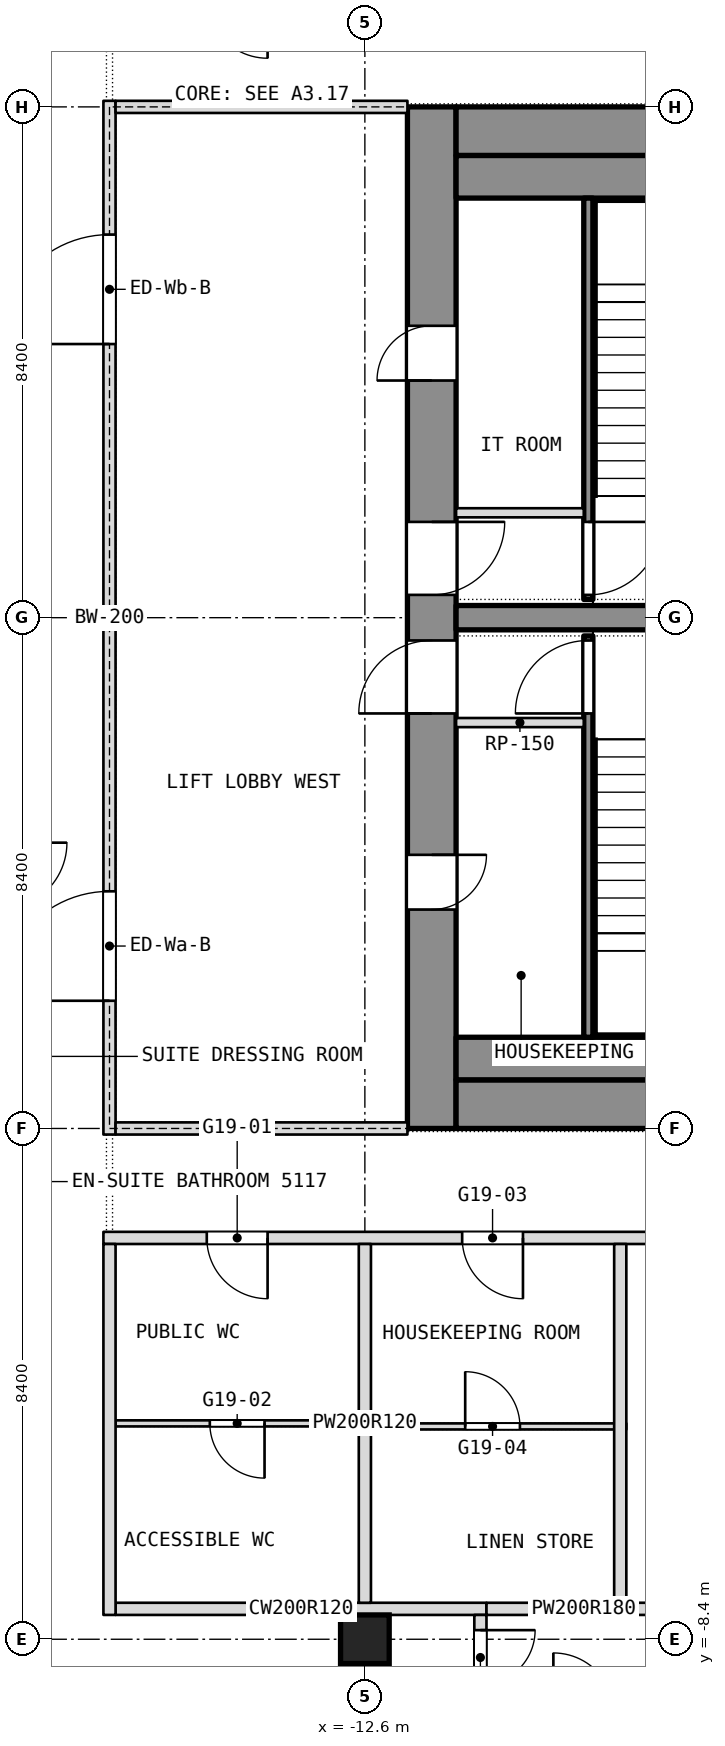
"""IFC4 building model, lengths in metres.
Left out: names, types, materials, properties, quantities, classifications, styles, units other than length and angle.
Written with IfcOpenShell. Run it as: python <this file> out.ifc"""

import sys

from ifc_helpers import new_model, si_unit, direction, frame, frame_2d, origin, origin_2d, place, context, subcontext, project, spatial, rectangle, extrude, element, fill, save


model = new_model("IFC4")
c1 = context("Model", 3, precision=1e-05, world=origin(), true_north=direction((0.0, 1.0)))
c2 = subcontext(c1, "Body", "Model", "MODEL_VIEW")
j1 = project(units=[si_unit("LENGTHUNIT", "METRE"), si_unit("PLANEANGLEUNIT", "RADIAN")], contexts=[c1])
p1 = place(None, origin())
s1 = spatial("IfcSite", under=j1, at=p1, CompositionType="ELEMENT")
p2 = place(p1, origin())
s2 = spatial("IfcBuilding", under=s1, at=p2, CompositionType="ELEMENT")
p3 = place(p2, frame((0.0, 0.0, 220.1)))
s3 = spatial("IfcBuildingStorey", under=s2, at=p3, CompositionType="ELEMENT", Elevation=220.1)
p4 = place(p3, frame((-11.5, 0.0, 0.0), z_axis=(0.0, 0.0, 1.0), x_axis=(0.0, 1.0, 0.0)))
e1 = element("IfcWall", 1, at=p4, inside=s3, PredefinedType="SHEAR", context=c2, shape_type="SweptSolid", body=[
    extrude(rectangle(XDim=16.8, YDim=0.8, at=frame_2d((8.4, 0.0))), origin(), (0.0, 0.0, 1.0), 3.6),
])
p5 = place(p4, frame((3.6, 0.0, 0.0)))
e2 = element("IfcOpeningElement", 2, at=p5, cuts=e1, PredefinedType="OPENING", context=c2, shape_type="SweptSolid", body=[
    extrude(rectangle(XDim=0.9, YDim=2.1, at=frame_2d((0.45, 1.05))), frame((0.0, 0.4, 0.0), z_axis=(0.0, -1.0, 0.0), x_axis=(1.0, 0.0, 0.0)), (0.0, 0.0, 1.0), 0.8),
])
p6 = place(p4, frame((6.825, 0.0, 0.0)))
e3 = element("IfcOpeningElement", 3, at=p6, cuts=e1, PredefinedType="OPENING", context=c2, shape_type="SweptSolid", body=[
    extrude(rectangle(XDim=1.2, YDim=2.1, at=frame_2d((0.6, 1.05))), frame((0.0, 0.4, 0.0), z_axis=(0.0, -1.0, 0.0), x_axis=(1.0, 0.0, 0.0)), (0.0, 0.0, 1.0), 0.8),
])
p7 = place(p4, frame((12.3, 0.0, 0.0)))
e4 = element("IfcOpeningElement", 4, at=p7, cuts=e1, PredefinedType="OPENING", context=c2, shape_type="SweptSolid", body=[
    extrude(rectangle(XDim=0.9, YDim=2.1, at=frame_2d((0.45, 1.05))), frame((0.0, 0.4, 0.0), z_axis=(0.0, -1.0, 0.0), x_axis=(1.0, 0.0, 0.0)), (0.0, 0.0, 1.0), 0.8),
])
p8 = place(p4, frame((8.775, 0.0, 0.0)))
e5 = element("IfcOpeningElement", 5, at=p8, cuts=e1, PredefinedType="OPENING", context=c2, shape_type="SweptSolid", body=[
    extrude(rectangle(XDim=1.2, YDim=2.1, at=frame_2d((0.6, 1.05))), frame((0.0, 0.4, 0.0), z_axis=(0.0, -1.0, 0.0), x_axis=(1.0, 0.0, 0.0)), (0.0, 0.0, 1.0), 0.8),
])
for number, where, z_axis, x_axis in (
    (6, (-11.1, 0.4, 0.0), (0.0, 0.0, 1.0), (1.0, 0.0, 0.0)),
    (7, (-11.1, 16.4, 0.0), (0.0, 0.0, 1.0), (1.0, 0.0, 0.0)),
):
    element("IfcWall", number, at=place(p3, frame(where, z_axis=z_axis, x_axis=x_axis)), inside=s3, PredefinedType="SHEAR", context=c2, shape_type="SweptSolid", body=[
        extrude(rectangle(XDim=22.2, YDim=0.8, at=frame_2d((11.1, 0.0))), origin(), (0.0, 0.0, 1.0), 3.6),
    ])
p9 = place(p3, frame((-11.1, 8.4, 0.0), z_axis=(0.0, 0.0, 1.0), x_axis=(1.0, 0.0, 0.0)))
e8 = element("IfcWall", 8, at=p9, inside=s3, PredefinedType="SHEAR", context=c2, shape_type="SweptSolid", body=[
    extrude(rectangle(XDim=6.7, YDim=0.4, at=frame_2d((3.35, 0.0))), origin(), (0.0, 0.0, 1.0), 3.6),
])
p10 = place(p3, frame((-12.6, -8.4, 0.0), z_axis=(0.0, 0.0, 1.0), x_axis=(1.0, 0.0, 0.0)))
e9 = element("IfcColumn", 9, at=p10, inside=s3, PredefinedType="COLUMN", context=c2, shape_type="SweptSolid", body=[
    extrude(rectangle(XDim=0.8, YDim=0.8, at=origin_2d()), origin(), (0.0, 0.0, 1.0), 3.6),
])
p11 = place(p3, frame((-16.7, -7.9, 0.0), z_axis=(0.0, 0.0, 1.0), x_axis=(1.0, 0.0, 0.0)))
e10 = element("IfcWall", 10, at=p11, inside=s3, PredefinedType="PARTITIONING", context=c2, shape_type="SweptSolid", body=[
    extrude(rectangle(XDim=6.1, YDim=0.2, at=frame_2d((3.05, 0.0))), origin(), (0.0, 0.0, 1.0), 3.34),
])
p12 = place(p3, frame((-10.6, -7.9, 0.0), z_axis=(0.0, 0.0, 1.0), x_axis=(1.0, 0.0, 0.0)))
e11 = element("IfcWall", 11, at=p12, inside=s3, PredefinedType="PARTITIONING", context=c2, shape_type="SweptSolid", body=[
    extrude(rectangle(XDim=3.2, YDim=0.2, at=frame_2d((1.6, 0.0))), origin(), (0.0, 0.0, 1.0), 3.34),
])
p13 = place(p3, frame((-12.5, -4.9, 0.0), z_axis=(0.0, 0.0, 1.0), x_axis=(1.0, 0.0, 0.0)))
e12 = element("IfcWall", 12, at=p13, inside=s3, PredefinedType="PARTITIONING", context=c2, shape_type="SweptSolid", body=[
    extrude(rectangle(XDim=4.2, YDim=0.1, at=frame_2d((2.1, 0.0))), origin(), (0.0, 0.0, 1.0), 3.34),
])
p14 = place(p13, frame((1.55, 0.0, 0.0)))
e13 = element("IfcOpeningElement", 13, at=p14, cuts=e12, PredefinedType="OPENING", context=c2, shape_type="SweptSolid", body=[
    extrude(rectangle(XDim=0.9, YDim=2.1, at=frame_2d((0.45, 1.05))), frame((0.0, 0.05, 0.0), z_axis=(0.0, -1.0, 0.0), x_axis=(1.0, 0.0, 0.0)), (0.0, 0.0, 1.0), 0.1),
])
p15 = place(p3, frame((-16.7, -4.85, 0.0), z_axis=(0.0, 0.0, 1.0), x_axis=(1.0, 0.0, 0.0)))
e14 = element("IfcWall", 14, at=p15, inside=s3, PredefinedType="PARTITIONING", context=c2, shape_type="SweptSolid", body=[
    extrude(rectangle(XDim=4.2, YDim=0.1, at=frame_2d((2.1, 0.0))), origin(), (0.0, 0.0, 1.0), 3.34),
])
p16 = place(p15, frame((1.55, 0.0, 0.0)))
e15 = element("IfcOpeningElement", 15, at=p16, cuts=e14, PredefinedType="OPENING", context=c2, shape_type="SweptSolid", body=[
    extrude(rectangle(XDim=0.9, YDim=2.1, at=frame_2d((0.45, 1.05))), frame((0.0, 0.05, 0.0), z_axis=(0.0, -1.0, 0.0), x_axis=(1.0, 0.0, 0.0)), (0.0, 0.0, 1.0), 0.1),
])
p17 = place(p3, frame((-16.9, -1.8, 0.0), z_axis=(0.0, 0.0, 1.0), x_axis=(1.0, 0.0, 0.0)))
e16 = element("IfcWall", 16, at=p17, inside=s3, PredefinedType="PARTITIONING", context=c2, shape_type="SweptSolid", body=[
    extrude(rectangle(XDim=33.8, YDim=0.2, at=frame_2d((16.9, 0.0))), origin(), (0.0, 0.0, 1.0), 3.34),
])
p18 = place(p17, frame((1.7, 0.0, 0.0)))
e17 = element("IfcOpeningElement", 17, at=p18, cuts=e16, PredefinedType="OPENING", context=c2, shape_type="SweptSolid", body=[
    extrude(rectangle(XDim=1.0, YDim=2.1, at=frame_2d((0.5, 1.05))), frame((0.0, 0.1, 0.0), z_axis=(0.0, -1.0, 0.0), x_axis=(1.0, 0.0, 0.0)), (0.0, 0.0, 1.0), 0.2),
])
p19 = place(p17, frame((5.9, 0.0, 0.0)))
e18 = element("IfcOpeningElement", 18, at=p19, cuts=e16, PredefinedType="OPENING", context=c2, shape_type="SweptSolid", body=[
    extrude(rectangle(XDim=1.0, YDim=2.1, at=frame_2d((0.5, 1.05))), frame((0.0, 0.1, 0.0), z_axis=(0.0, -1.0, 0.0), x_axis=(1.0, 0.0, 0.0)), (0.0, 0.0, 1.0), 0.2),
])
p20 = place(p17, frame((10.1, 0.0, 0.0)))
e19 = element("IfcOpeningElement", 19, at=p20, cuts=e16, PredefinedType="OPENING", context=c2, shape_type="SweptSolid", body=[
    extrude(rectangle(XDim=1.0, YDim=2.1, at=frame_2d((0.5, 1.05))), frame((0.0, 0.1, 0.0), z_axis=(0.0, -1.0, 0.0), x_axis=(1.0, 0.0, 0.0)), (0.0, 0.0, 1.0), 0.2),
])
p21 = place(p17, frame((22.7, 0.0, 0.0)))
e20 = element("IfcOpeningElement", 20, at=p21, cuts=e16, PredefinedType="OPENING", context=c2, shape_type="SweptSolid", body=[
    extrude(rectangle(XDim=1.0, YDim=2.1, at=frame_2d((0.5, 1.05))), frame((0.0, 0.1, 0.0), z_axis=(0.0, -1.0, 0.0), x_axis=(1.0, 0.0, 0.0)), (0.0, 0.0, 1.0), 0.2),
])
p22 = place(p17, frame((26.9, 0.0, 0.0)))
e21 = element("IfcOpeningElement", 21, at=p22, cuts=e16, PredefinedType="OPENING", context=c2, shape_type="SweptSolid", body=[
    extrude(rectangle(XDim=1.0, YDim=2.1, at=frame_2d((0.5, 1.05))), frame((0.0, 0.1, 0.0), z_axis=(0.0, -1.0, 0.0), x_axis=(1.0, 0.0, 0.0)), (0.0, 0.0, 1.0), 0.2),
])
p23 = place(p17, frame((31.1, 0.0, 0.0)))
e22 = element("IfcOpeningElement", 22, at=p23, cuts=e16, PredefinedType="OPENING", context=c2, shape_type="SweptSolid", body=[
    extrude(rectangle(XDim=1.0, YDim=2.1, at=frame_2d((0.5, 1.05))), frame((0.0, 0.1, 0.0), z_axis=(0.0, -1.0, 0.0), x_axis=(1.0, 0.0, 0.0)), (0.0, 0.0, 1.0), 0.2),
])
p24 = place(p17, frame((16.4, 0.0, 0.0)))
e23 = element("IfcOpeningElement", 23, at=p24, cuts=e16, PredefinedType="OPENING", context=c2, shape_type="SweptSolid", body=[
    extrude(rectangle(XDim=1.0, YDim=2.1, at=frame_2d((0.5, 1.05))), frame((0.0, 0.1, 0.0), z_axis=(0.0, -1.0, 0.0), x_axis=(1.0, 0.0, 0.0)), (0.0, 0.0, 1.0), 0.2),
])
p25 = place(p3, frame((-8.4, -8.0, 0.0), z_axis=(0.0, 0.0, 1.0), x_axis=(0.0, 1.0, 0.0)))
e24 = element("IfcWall", 24, at=p25, inside=s3, PredefinedType="PARTITIONING", context=c2, shape_type="SweptSolid", body=[
    extrude(rectangle(XDim=6.1, YDim=0.2, at=frame_2d((3.05, 0.0))), origin(), (0.0, 0.0, 1.0), 3.34),
])
p26 = place(p3, frame((-10.7, -9.5, 0.0), z_axis=(0.0, 0.0, 1.0), x_axis=(0.0, 1.0, 0.0)))
e25 = element("IfcWall", 25, at=p26, inside=s3, PredefinedType="PARTITIONING", context=c2, shape_type="SweptSolid", body=[
    extrude(rectangle(XDim=1.5, YDim=0.2, at=frame_2d((0.75, 0.0))), origin(), (0.0, 0.0, 1.0), 3.34),
])
p27 = place(p26, frame((0.35, 0.0, 0.0)))
e26 = element("IfcOpeningElement", 26, at=p27, cuts=e25, PredefinedType="OPENING", context=c2, shape_type="SweptSolid", body=[
    extrude(rectangle(XDim=0.9, YDim=2.1, at=frame_2d((0.45, 1.05))), frame((0.0, 0.1, 0.0), z_axis=(0.0, -1.0, 0.0), x_axis=(1.0, 0.0, 0.0)), (0.0, 0.0, 1.0), 0.2),
])
p28 = place(p3, frame((-12.6, -7.8, 0.0), z_axis=(0.0, 0.0, 1.0), x_axis=(0.0, 1.0, 0.0)))
e27 = element("IfcWall", 27, at=p28, inside=s3, PredefinedType="PARTITIONING", context=c2, shape_type="SweptSolid", body=[
    extrude(rectangle(XDim=5.9, YDim=0.2, at=frame_2d((2.95, 0.0))), origin(), (0.0, 0.0, 1.0), 3.34),
])
p29 = place(p3, frame((-16.8, -8.0, 0.0), z_axis=(0.0, 0.0, 1.0), x_axis=(0.0, 1.0, 0.0)))
e28 = element("IfcWall", 28, at=p29, inside=s3, PredefinedType="PARTITIONING", context=c2, shape_type="SweptSolid", body=[
    extrude(rectangle(XDim=6.1, YDim=0.2, at=frame_2d((3.05, 0.0))), origin(), (0.0, 0.0, 1.0), 3.34),
])
for number, where, z_axis, x_axis in (
    (29, (-11.1, 1.15, 0.0), (0.0, 0.0, 1.0), (1.0, 0.0, 0.0)),
    (30, (-11.1, 15.65, 0.0), (0.0, 0.0, 1.0), (1.0, 0.0, 0.0)),
):
    element("IfcWall", number, at=place(p3, frame(where, z_axis=z_axis, x_axis=x_axis)), inside=s3, PredefinedType="PARTITIONING", context=c2, shape_type="SweptSolid", body=[
        extrude(rectangle(XDim=22.2, YDim=0.7, at=frame_2d((11.1, 0.0))), origin(), (0.0, 0.0, 1.0), 3.34),
    ])
p30 = place(p3, frame((-8.925, 1.5, 0.0), z_axis=(0.0, 0.0, 1.0), x_axis=(0.0, 1.0, 0.0)))
e31 = element("IfcWall", 31, at=p30, inside=s3, PredefinedType="SHEAR", context=c2, shape_type="SweptSolid", body=[
    extrude(rectangle(XDim=6.6, YDim=0.15, at=frame_2d((3.3, 0.0))), origin(), (0.0, 0.0, 1.0), 3.34),
])
p31 = place(p30, frame((5.325, 0.0, 0.0)))
e32 = element("IfcOpeningElement", 32, at=p31, cuts=e31, PredefinedType="OPENING", context=c2, shape_type="SweptSolid", body=[
    extrude(rectangle(XDim=1.2, YDim=2.1, at=frame_2d((0.6, 1.05))), frame((0.0, 0.075, 0.0), z_axis=(0.0, -1.0, 0.0), x_axis=(1.0, 0.0, 0.0)), (0.0, 0.0, 1.0), 0.15),
])
p32 = place(p3, frame((-11.1, 6.675, 0.0), z_axis=(0.0, 0.0, 1.0), x_axis=(1.0, 0.0, 0.0)))
e33 = element("IfcWall", 33, at=p32, inside=s3, PredefinedType="PARTITIONING", context=c2, shape_type="SweptSolid", body=[
    extrude(rectangle(XDim=2.1, YDim=0.15, at=frame_2d((1.05, 0.0))), origin(), (0.0, 0.0, 1.0), 3.34),
])
p33 = place(p3, frame((-8.925, 8.7, 0.0), z_axis=(0.0, 0.0, 1.0), x_axis=(0.0, 1.0, 0.0)))
e34 = element("IfcWall", 34, at=p33, inside=s3, PredefinedType="SHEAR", context=c2, shape_type="SweptSolid", body=[
    extrude(rectangle(XDim=6.6, YDim=0.15, at=frame_2d((3.3, 0.0))), origin(), (0.0, 0.0, 1.0), 3.34),
])
p34 = place(p33, frame((0.075, 0.0, 0.0)))
e35 = element("IfcOpeningElement", 35, at=p34, cuts=e34, PredefinedType="OPENING", context=c2, shape_type="SweptSolid", body=[
    extrude(rectangle(XDim=1.2, YDim=2.1, at=frame_2d((0.6, 1.05))), frame((0.0, 0.075, 0.0), z_axis=(0.0, -1.0, 0.0), x_axis=(1.0, 0.0, 0.0)), (0.0, 0.0, 1.0), 0.15),
])
p35 = place(p3, frame((-11.1, 10.125, 0.0), z_axis=(0.0, 0.0, 1.0), x_axis=(1.0, 0.0, 0.0)))
e36 = element("IfcWall", 36, at=p35, inside=s3, PredefinedType="PARTITIONING", context=c2, shape_type="SweptSolid", body=[
    extrude(rectangle(XDim=2.1, YDim=0.15, at=frame_2d((1.05, 0.0))), origin(), (0.0, 0.0, 1.0), 3.34),
])
p36 = place(p3, frame((-16.8, -0.1, 0.0), z_axis=(0.0, 0.0, 1.0), x_axis=(0.0, 1.0, 0.0)))
e37 = element("IfcWall", 37, at=p36, inside=s3, PredefinedType="PARTITIONING", context=c2, shape_type="SweptSolid", body=[
    extrude(rectangle(XDim=17.0, YDim=0.2, at=frame_2d((8.5, 0.0))), origin(), (0.0, 0.0, 1.0), 3.34),
])
p37 = place(p36, frame((2.2, 0.0, 0.0)))
e38 = element("IfcOpeningElement", 38, at=p37, cuts=e37, PredefinedType="OPENING", context=c2, shape_type="SweptSolid", body=[
    extrude(rectangle(XDim=1.8, YDim=2.1, at=frame_2d((0.9, 1.05))), frame((0.0, 0.1, 0.0), z_axis=(0.0, -1.0, 0.0), x_axis=(1.0, 0.0, 0.0)), (0.0, 0.0, 1.0), 0.2),
])
p38 = place(p36, frame((13.0, 0.0, 0.0)))
e39 = element("IfcOpeningElement", 39, at=p38, cuts=e37, PredefinedType="OPENING", context=c2, shape_type="SweptSolid", body=[
    extrude(rectangle(XDim=1.8, YDim=2.1, at=frame_2d((0.9, 1.05))), frame((0.0, 0.1, 0.0), z_axis=(0.0, -1.0, 0.0), x_axis=(1.0, 0.0, 0.0)), (0.0, 0.0, 1.0), 0.2),
])
for number, where, z_axis, x_axis in (
    (40, (-16.7, 0.0, 0.0), (0.0, 0.0, 1.0), (1.0, 0.0, 0.0)),
    (41, (-16.7, 16.8, 0.0), (0.0, 0.0, 1.0), (1.0, 0.0, 0.0)),
):
    element("IfcWall", number, at=place(p3, frame(where, z_axis=z_axis, x_axis=x_axis)), inside=s3, PredefinedType="PARTITIONING", context=c2, shape_type="SweptSolid", body=[
        extrude(rectangle(XDim=4.8, YDim=0.2, at=frame_2d((2.4, 0.0))), origin(), (0.0, 0.0, 1.0), 2.94),
    ])
p39 = place(p14, origin())
e42 = element("IfcDoor", 42, at=p39, inside=s3, OperationType="SINGLE_SWING_RIGHT", PredefinedType="DOOR", context=c2, shape_type="SweptSolid", body=[
    extrude(rectangle(XDim=0.9, YDim=2.1, at=frame_2d((0.45, 1.05))), frame((0.0, 0.025, 0.0), z_axis=(0.0, -1.0, 0.0), x_axis=(1.0, 0.0, 0.0)), (0.0, 0.0, 1.0), 0.05),
])
fill(e13, e42)
p40 = place(p16, origin())
e43 = element("IfcDoor", 43, at=p40, inside=s3, OperationType="SINGLE_SWING_RIGHT", PredefinedType="DOOR", context=c2, shape_type="SweptSolid", body=[
    extrude(rectangle(XDim=0.9, YDim=2.1, at=frame_2d((0.45, 1.05))), frame((0.0, 0.025, 0.0), z_axis=(0.0, -1.0, 0.0), x_axis=(1.0, 0.0, 0.0)), (0.0, 0.0, 1.0), 0.05),
])
fill(e15, e43)
p41 = place(p18, origin())
e44 = element("IfcDoor", 44, at=p41, inside=s3, OperationType="SINGLE_SWING_LEFT", PredefinedType="DOOR", context=c2, shape_type="SweptSolid", body=[
    extrude(rectangle(XDim=1.0, YDim=2.1, at=frame_2d((0.5, 1.05))), frame((0.0, 0.025, 0.0), z_axis=(0.0, -1.0, 0.0), x_axis=(1.0, 0.0, 0.0)), (0.0, 0.0, 1.0), 0.05),
])
fill(e17, e44)
p42 = place(p19, origin())
e45 = element("IfcDoor", 45, at=p42, inside=s3, OperationType="SINGLE_SWING_LEFT", PredefinedType="DOOR", context=c2, shape_type="SweptSolid", body=[
    extrude(rectangle(XDim=1.0, YDim=2.1, at=frame_2d((0.5, 1.05))), frame((0.0, 0.025, 0.0), z_axis=(0.0, -1.0, 0.0), x_axis=(1.0, 0.0, 0.0)), (0.0, 0.0, 1.0), 0.05),
])
fill(e18, e45)
p43 = place(p27, origin())
e46 = element("IfcDoor", 46, at=p43, inside=s3, OperationType="SINGLE_SWING_LEFT", PredefinedType="DOOR", context=c2, shape_type="SweptSolid", body=[
    extrude(rectangle(XDim=0.9, YDim=2.1, at=frame_2d((0.45, 1.05))), frame((0.0, 0.025, 0.0), z_axis=(0.0, -1.0, 0.0), x_axis=(1.0, 0.0, 0.0)), (0.0, 0.0, 1.0), 0.05),
])
fill(e26, e46)
p44 = place(p5, origin())
e47 = element("IfcDoor", 47, at=p44, inside=s3, OperationType="SINGLE_SWING_LEFT", PredefinedType="DOOR", context=c2, shape_type="SweptSolid", body=[
    extrude(rectangle(XDim=0.9, YDim=2.1, at=frame_2d((0.45, 1.05))), frame((0.0, 0.025, 0.0), z_axis=(0.0, -1.0, 0.0), x_axis=(1.0, 0.0, 0.0)), (0.0, 0.0, 1.0), 0.05),
])
fill(e2, e47)
p45 = place(p6, origin())
e48 = element("IfcDoor", 48, at=p45, inside=s3, OperationType="SINGLE_SWING_LEFT", PredefinedType="DOOR", context=c2, shape_type="SweptSolid", body=[
    extrude(rectangle(XDim=1.2, YDim=2.1, at=frame_2d((0.6, 1.05))), frame((0.0, 0.025, 0.0), z_axis=(0.0, -1.0, 0.0), x_axis=(1.0, 0.0, 0.0)), (0.0, 0.0, 1.0), 0.05),
])
fill(e3, e48)
p46 = place(p31, origin())
e49 = element("IfcDoor", 49, at=p46, inside=s3, OperationType="SINGLE_SWING_LEFT", PredefinedType="DOOR", context=c2, shape_type="SweptSolid", body=[
    extrude(rectangle(XDim=1.2, YDim=2.1, at=frame_2d((0.6, 1.05))), frame((0.0, 0.025, 0.0), z_axis=(0.0, -1.0, 0.0), x_axis=(1.0, 0.0, 0.0)), (0.0, 0.0, 1.0), 0.05),
])
fill(e32, e49)
p47 = place(p7, origin())
e50 = element("IfcDoor", 50, at=p47, inside=s3, OperationType="SINGLE_SWING_LEFT", PredefinedType="DOOR", context=c2, shape_type="SweptSolid", body=[
    extrude(rectangle(XDim=0.9, YDim=2.1, at=frame_2d((0.45, 1.05))), frame((0.0, 0.025, 0.0), z_axis=(0.0, -1.0, 0.0), x_axis=(1.0, 0.0, 0.0)), (0.0, 0.0, 1.0), 0.05),
])
fill(e4, e50)
p48 = place(p8, origin())
e51 = element("IfcDoor", 51, at=p48, inside=s3, OperationType="SINGLE_SWING_LEFT", PredefinedType="DOOR", context=c2, shape_type="SweptSolid", body=[
    extrude(rectangle(XDim=1.2, YDim=2.1, at=frame_2d((0.6, 1.05))), frame((0.0, 0.025, 0.0), z_axis=(0.0, -1.0, 0.0), x_axis=(1.0, 0.0, 0.0)), (0.0, 0.0, 1.0), 0.05),
])
fill(e5, e51)
p49 = place(p34, origin())
e52 = element("IfcDoor", 52, at=p49, inside=s3, OperationType="SINGLE_SWING_LEFT", PredefinedType="DOOR", context=c2, shape_type="SweptSolid", body=[
    extrude(rectangle(XDim=1.2, YDim=2.1, at=frame_2d((0.6, 1.05))), frame((0.0, 0.025, 0.0), z_axis=(0.0, -1.0, 0.0), x_axis=(1.0, 0.0, 0.0)), (0.0, 0.0, 1.0), 0.05),
])
fill(e35, e52)
p50 = place(p37, origin())
e53 = element("IfcDoor", 53, at=p50, inside=s3, OperationType="DOUBLE_DOOR_SINGLE_SWING", PredefinedType="DOOR", context=c2, shape_type="SweptSolid", body=[
    extrude(rectangle(XDim=1.8, YDim=2.1, at=frame_2d((0.9, 1.05))), frame((0.0, 0.025, 0.0), z_axis=(0.0, -1.0, 0.0), x_axis=(1.0, 0.0, 0.0)), (0.0, 0.0, 1.0), 0.05),
])
fill(e38, e53)
p51 = place(p38, origin())
e54 = element("IfcDoor", 54, at=p51, inside=s3, OperationType="DOUBLE_DOOR_SINGLE_SWING", PredefinedType="DOOR", context=c2, shape_type="SweptSolid", body=[
    extrude(rectangle(XDim=1.8, YDim=2.1, at=frame_2d((0.9, 1.05))), frame((0.0, 0.025, 0.0), z_axis=(0.0, -1.0, 0.0), x_axis=(1.0, 0.0, 0.0)), (0.0, 0.0, 1.0), 0.05),
])
fill(e39, e54)
save(model, sys.argv[1])
